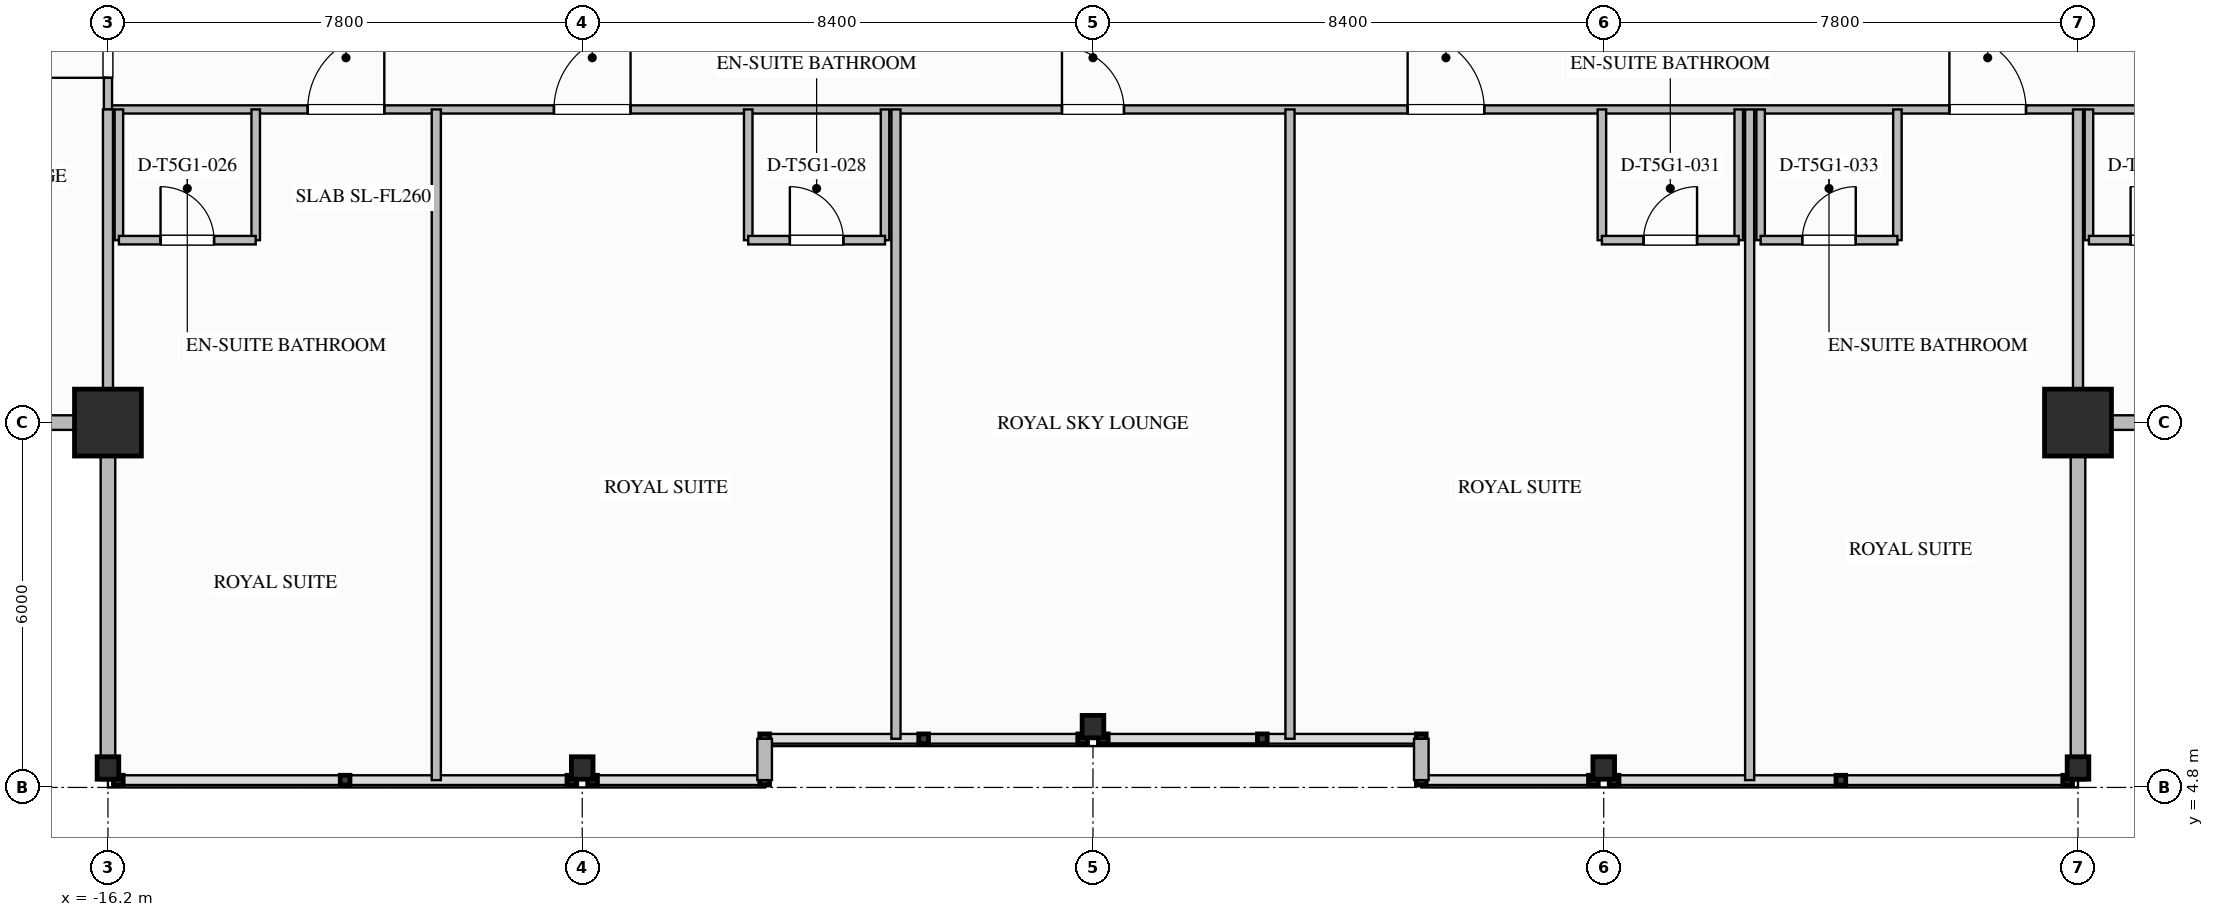
"""IFC4 building model, lengths in metres.
Left out: names, types, materials, properties, quantities, classifications, styles, units other than length and angle.
Written with IfcOpenShell. Run it as: python <this file> out.ifc"""

import sys

from ifc_helpers import new_model, si_unit, direction, frame, frame_2d, origin, origin_2d, place, context, subcontext, project, spatial, rectangle, i_section, extrude, element, fill, save


model = new_model("IFC4")
c1 = context("Model", 3, precision=1e-05, world=origin(), true_north=direction((0.0, 1.0)))
c2 = subcontext(c1, "Body", "Model", "MODEL_VIEW")
j1 = project(units=[si_unit("LENGTHUNIT", "METRE"), si_unit("PLANEANGLEUNIT", "RADIAN")], contexts=[c1])
p1 = place(None, origin())
s1 = spatial("IfcSite", under=j1, at=p1, CompositionType="ELEMENT")
p2 = place(p1, origin())
s2 = spatial("IfcBuilding", under=s1, at=p2, CompositionType="ELEMENT")
p3 = place(p2, frame((0.0, 0.0, 272.3)))
s3 = spatial("IfcBuildingStorey", under=s2, at=p3, CompositionType="ELEMENT", Elevation=272.3)
for number, where, z_axis, x_axis in (
    (1, (-16.2, 10.8, 0.0), (0.0, 0.0, 1.0), (1.0, 0.0, 0.0)),
    (2, (16.2, 10.8, 0.0), (0.0, 0.0, 1.0), (1.0, 0.0, 0.0)),
):
    element("IfcColumn", number, at=place(p3, frame(where, z_axis=z_axis, x_axis=x_axis)), inside=s3, PredefinedType="COLUMN", context=c2, shape_type="SweptSolid", body=[
        extrude(rectangle(XDim=1.1, YDim=1.1, at=origin_2d()), origin(), (0.0, 0.0, 1.0), 3.65),
    ])
for number, where, z_axis, x_axis in (
    (3, (-16.2, 5.12, 0.0), (0.0, 0.0, 1.0), (0.0, 1.0, 0.0)),
    (4, (-8.4, 5.12, 0.0), (0.0, 0.0, 1.0), (0.0, 1.0, 0.0)),
    (5, (0.0, 5.8, 0.0), (0.0, 0.0, 1.0), (0.0, 1.0, 0.0)),
    (6, (8.4, 5.12, 0.0), (0.0, 0.0, 1.0), (0.0, 1.0, 0.0)),
    (7, (16.2, 5.12, 0.0), (0.0, 0.0, 1.0), (0.0, 1.0, 0.0)),
):
    element("IfcColumn", number, at=place(p3, frame(where, z_axis=z_axis, x_axis=x_axis)), inside=s3, PredefinedType="COLUMN", context=c2, shape_type="SweptSolid", body=[
        extrude(i_section(OverallWidth=0.369, OverallDepth=0.356, WebThickness=0.011, FlangeThickness=0.018, FilletRadius=0.025, at=origin_2d()), origin(), (0.0, 0.0, 1.0), 3.647),
    ])
for number, where, z_axis, x_axis in (
    (8, (-16.2, 4.92, 0.0), (0.0, 0.0, 1.0), (0.0, 1.0, 0.0)),
    (9, (-16.2, 10.8, 0.0), (0.0, 0.0, 1.0), (-1.0, 0.0, 0.0)),
    (10, (22.08, 10.8, 0.0), (0.0, 0.0, 1.0), (-1.0, 0.0, 0.0)),
    (11, (16.2, 10.8, 0.0), (0.0, 0.0, 1.0), (0.0, -1.0, 0.0)),
):
    element("IfcWall", number, at=place(p3, frame(where, z_axis=z_axis, x_axis=x_axis)), inside=s3, PredefinedType="STANDARD", context=c2, shape_type="SweptSolid", body=[
        extrude(rectangle(XDim=5.88, YDim=0.24, at=frame_2d((2.94, 0.0))), origin(), (0.0, 0.0, 1.0), 2.779),
    ])
for number, where, z_axis, x_axis in (
    (12, (5.4, 4.92, 0.0), (0.0, 0.0, 1.0), (0.0, 1.0, 0.0)),
    (13, (-5.4, 5.6, 0.0), (0.0, 0.0, 1.0), (0.0, -1.0, 0.0)),
):
    element("IfcWall", number, at=place(p3, frame(where, z_axis=z_axis, x_axis=x_axis)), inside=s3, PredefinedType="STANDARD", context=c2, shape_type="SweptSolid", body=[
        extrude(rectangle(XDim=0.68, YDim=0.24, at=frame_2d((0.34, 0.0))), origin(), (0.0, 0.0, 1.0), 3.39),
    ])
p4 = place(p3, frame((-16.2, 15.95, 0.0), z_axis=(0.0, 0.0, 1.0), x_axis=(1.0, 0.0, 0.0)))
e14 = element("IfcWall", 14, at=p4, inside=s3, PredefinedType="PARTITIONING", context=c2, shape_type="SweptSolid", body=[
    extrude(rectangle(XDim=38.28, YDim=0.135, at=frame_2d((19.14, 0.0))), origin(), (0.0, 0.0, 1.0), 3.39),
])
p5 = place(p4, frame((35.785, 0.0, 0.0)))
e15 = element("IfcOpeningElement", 15, at=p5, cuts=e14, PredefinedType="OPENING", context=c2, shape_type="SweptSolid", body=[
    extrude(rectangle(XDim=1.26, YDim=2.2, at=frame_2d((0.63, 1.1))), frame((0.0, 0.077, 0.0), z_axis=(0.0, -1.0, 0.0), x_axis=(1.0, 0.0, 0.0)), (0.0, 0.0, 1.0), 0.155),
])
p6 = place(p4, frame((3.285, 0.0, 0.0)))
e16 = element("IfcOpeningElement", 16, at=p6, cuts=e14, PredefinedType="OPENING", context=c2, shape_type="SweptSolid", body=[
    extrude(rectangle(XDim=1.26, YDim=2.2, at=frame_2d((0.63, 1.1))), frame((0.0, 0.077, 0.0), z_axis=(0.0, -1.0, 0.0), x_axis=(1.0, 0.0, 0.0)), (0.0, 0.0, 1.0), 0.155),
])
p7 = place(p4, frame((7.335, 0.0, 0.0)))
e17 = element("IfcOpeningElement", 17, at=p7, cuts=e14, PredefinedType="OPENING", context=c2, shape_type="SweptSolid", body=[
    extrude(rectangle(XDim=1.26, YDim=2.2, at=frame_2d((0.63, 1.1))), frame((0.0, 0.077, 0.0), z_axis=(0.0, -1.0, 0.0), x_axis=(1.0, 0.0, 0.0)), (0.0, 0.0, 1.0), 0.155),
])
p8 = place(p4, frame((15.69, 0.0, 0.0)))
e18 = element("IfcOpeningElement", 18, at=p8, cuts=e14, PredefinedType="OPENING", context=c2, shape_type="SweptSolid", body=[
    extrude(rectangle(XDim=1.02, YDim=2.15, at=frame_2d((0.51, 1.075))), frame((0.0, 0.077, 0.0), z_axis=(0.0, -1.0, 0.0), x_axis=(1.0, 0.0, 0.0)), (0.0, 0.0, 1.0), 0.155),
])
p9 = place(p4, frame((21.375, 0.0, 0.0)))
e19 = element("IfcOpeningElement", 19, at=p9, cuts=e14, PredefinedType="OPENING", context=c2, shape_type="SweptSolid", body=[
    extrude(rectangle(XDim=1.26, YDim=2.2, at=frame_2d((0.63, 1.1))), frame((0.0, 0.077, 0.0), z_axis=(0.0, -1.0, 0.0), x_axis=(1.0, 0.0, 0.0)), (0.0, 0.0, 1.0), 0.155),
])
p10 = place(p4, frame((30.285, 0.0, 0.0)))
e20 = element("IfcOpeningElement", 20, at=p10, cuts=e14, PredefinedType="OPENING", context=c2, shape_type="SweptSolid", body=[
    extrude(rectangle(XDim=1.26, YDim=2.2, at=frame_2d((0.63, 1.1))), frame((0.0, 0.077, 0.0), z_axis=(0.0, -1.0, 0.0), x_axis=(1.0, 0.0, 0.0)), (0.0, 0.0, 1.0), 0.155),
])
p11 = place(p3, frame((-16.2, 15.95, 0.0), z_axis=(0.0, 0.0, 1.0), x_axis=(0.0, 1.0, 0.0)))
e21 = element("IfcWall", 21, at=p11, inside=s3, PredefinedType="PARTITIONING", context=c2, shape_type="SweptSolid", body=[
    extrude(rectangle(XDim=2.45, YDim=0.135, at=frame_2d((1.225, 0.0))), origin(), (0.0, 0.0, 1.0), 2.764),
])
p12 = place(p11, frame((0.52, 0.0, 0.0)))
e22 = element("IfcOpeningElement", 22, at=p12, cuts=e21, PredefinedType="OPENING", context=c2, shape_type="SweptSolid", body=[
    extrude(rectangle(XDim=1.02, YDim=2.15, at=frame_2d((0.51, 1.075))), frame((0.0, 0.077, 0.0), z_axis=(0.0, -1.0, 0.0), x_axis=(1.0, 0.0, 0.0)), (0.0, 0.0, 1.0), 0.155),
])
for number, where, z_axis, x_axis in (
    (23, (-16.2, 10.92, 0.0), (0.0, 0.0, 1.0), (0.0, 1.0, 0.0)),
    (24, (16.2, 10.92, 0.0), (0.0, 0.0, 1.0), (0.0, 1.0, 0.0)),
):
    element("IfcWall", number, at=place(p3, frame(where, z_axis=z_axis, x_axis=x_axis)), inside=s3, PredefinedType="PARTITIONING", context=c2, shape_type="SweptSolid", body=[
        extrude(rectangle(XDim=5.03, YDim=0.165, at=frame_2d((2.515, 0.0))), origin(), (0.0, 0.0, 1.0), 2.764),
    ])
p13 = place(p3, frame((16.38, 15.95, 0.0), z_axis=(0.0, 0.0, 1.0), x_axis=(0.0, -1.0, 0.0)))
e25 = element("IfcWall", 25, at=p13, inside=s3, PredefinedType="PLUMBINGWALL", context=c2, shape_type="SweptSolid", body=[
    extrude(rectangle(XDim=2.15, YDim=0.14, at=frame_2d((1.075, 0.0))), origin(), (0.0, 0.0, 1.0), 2.764),
])
p14 = place(p3, frame((16.38, 13.8, 0.0), z_axis=(0.0, 0.0, 1.0), x_axis=(1.0, 0.0, 0.0)))
e26 = element("IfcWall", 26, at=p14, inside=s3, PredefinedType="PLUMBINGWALL", context=c2, shape_type="SweptSolid", body=[
    extrude(rectangle(XDim=2.25, YDim=0.14, at=frame_2d((1.125, 0.0))), origin(), (0.0, 0.0, 1.0), 3.39),
])
p15 = place(p14, frame((0.685, 0.0, 0.0)))
e27 = element("IfcOpeningElement", 27, at=p15, cuts=e26, PredefinedType="OPENING", context=c2, shape_type="SweptSolid", body=[
    extrude(rectangle(XDim=0.88, YDim=2.1, at=frame_2d((0.44, 1.05))), frame((0.0, 0.08, 0.0), z_axis=(0.0, -1.0, 0.0), x_axis=(1.0, 0.0, 0.0)), (0.0, 0.0, 1.0), 0.16),
])
p16 = place(p3, frame((-16.02, 15.95, 0.0), z_axis=(0.0, 0.0, 1.0), x_axis=(0.0, -1.0, 0.0)))
e28 = element("IfcWall", 28, at=p16, inside=s3, PredefinedType="PLUMBINGWALL", context=c2, shape_type="SweptSolid", body=[
    extrude(rectangle(XDim=2.15, YDim=0.14, at=frame_2d((1.075, 0.0))), origin(), (0.0, 0.0, 1.0), 2.764),
])
p17 = place(p3, frame((-13.77, 15.95, 0.0), z_axis=(0.0, 0.0, 1.0), x_axis=(0.0, -1.0, 0.0)))
e29 = element("IfcWall", 29, at=p17, inside=s3, PredefinedType="PLUMBINGWALL", context=c2, shape_type="SweptSolid", body=[
    extrude(rectangle(XDim=2.15, YDim=0.14, at=frame_2d((1.075, 0.0))), origin(), (0.0, 0.0, 1.0), 3.39),
])
p18 = place(p3, frame((-16.02, 13.8, 0.0), z_axis=(0.0, 0.0, 1.0), x_axis=(1.0, 0.0, 0.0)))
e30 = element("IfcWall", 30, at=p18, inside=s3, PredefinedType="PLUMBINGWALL", context=c2, shape_type="SweptSolid", body=[
    extrude(rectangle(XDim=2.25, YDim=0.14, at=frame_2d((1.125, 0.0))), origin(), (0.0, 0.0, 1.0), 3.39),
])
p19 = place(p18, frame((0.685, 0.0, 0.0)))
e31 = element("IfcOpeningElement", 31, at=p19, cuts=e30, PredefinedType="OPENING", context=c2, shape_type="SweptSolid", body=[
    extrude(rectangle(XDim=0.88, YDim=2.1, at=frame_2d((0.44, 1.05))), frame((0.0, 0.08, 0.0), z_axis=(0.0, -1.0, 0.0), x_axis=(1.0, 0.0, 0.0)), (0.0, 0.0, 1.0), 0.16),
])
p20 = place(p3, frame((-10.8, 4.92, 0.0), z_axis=(0.0, 0.0, 1.0), x_axis=(0.0, 1.0, 0.0)))
e32 = element("IfcWall", 32, at=p20, inside=s3, PredefinedType="PARTITIONING", context=c2, shape_type="SweptSolid", body=[
    extrude(rectangle(XDim=11.03, YDim=0.15, at=frame_2d((5.515, 0.0))), origin(), (0.0, 0.0, 1.0), 3.39),
])
for number, where, z_axis, x_axis in (
    (33, (-5.67, 15.95, 0.0), (0.0, 0.0, 1.0), (0.0, -1.0, 0.0)),
    (34, (-3.42, 15.95, 0.0), (0.0, 0.0, 1.0), (0.0, -1.0, 0.0)),
):
    element("IfcWall", number, at=place(p3, frame(where, z_axis=z_axis, x_axis=x_axis)), inside=s3, PredefinedType="PLUMBINGWALL", context=c2, shape_type="SweptSolid", body=[
        extrude(rectangle(XDim=2.15, YDim=0.14, at=frame_2d((1.075, 0.0))), origin(), (0.0, 0.0, 1.0), 3.39),
    ])
p21 = place(p3, frame((-5.67, 13.8, 0.0), z_axis=(0.0, 0.0, 1.0), x_axis=(1.0, 0.0, 0.0)))
e35 = element("IfcWall", 35, at=p21, inside=s3, PredefinedType="PLUMBINGWALL", context=c2, shape_type="SweptSolid", body=[
    extrude(rectangle(XDim=2.25, YDim=0.14, at=frame_2d((1.125, 0.0))), origin(), (0.0, 0.0, 1.0), 3.39),
])
p22 = place(p21, frame((0.685, 0.0, 0.0)))
e36 = element("IfcOpeningElement", 36, at=p22, cuts=e35, PredefinedType="OPENING", context=c2, shape_type="SweptSolid", body=[
    extrude(rectangle(XDim=0.88, YDim=2.1, at=frame_2d((0.44, 1.05))), frame((0.0, 0.08, 0.0), z_axis=(0.0, -1.0, 0.0), x_axis=(1.0, 0.0, 0.0)), (0.0, 0.0, 1.0), 0.16),
])
for number, where, z_axis, x_axis in (
    (37, (-3.24, 5.6, 0.0), (0.0, 0.0, 1.0), (0.0, 1.0, 0.0)),
    (38, (3.24, 5.6, 0.0), (0.0, 0.0, 1.0), (0.0, 1.0, 0.0)),
):
    element("IfcWall", number, at=place(p3, frame(where, z_axis=z_axis, x_axis=x_axis)), inside=s3, PredefinedType="PARTITIONING", context=c2, shape_type="SweptSolid", body=[
        extrude(rectangle(XDim=10.35, YDim=0.15, at=frame_2d((5.175, 0.0))), origin(), (0.0, 0.0, 1.0), 3.39),
    ])
p23 = place(p3, frame((8.37, 15.95, 0.0), z_axis=(0.0, 0.0, 1.0), x_axis=(0.0, -1.0, 0.0)))
e39 = element("IfcWall", 39, at=p23, inside=s3, PredefinedType="PLUMBINGWALL", context=c2, shape_type="SweptSolid", body=[
    extrude(rectangle(XDim=2.15, YDim=0.14, at=frame_2d((1.075, 0.0))), origin(), (0.0, 0.0, 1.0), 2.767),
])
p24 = place(p3, frame((10.62, 15.95, 0.0), z_axis=(0.0, 0.0, 1.0), x_axis=(0.0, -1.0, 0.0)))
e40 = element("IfcWall", 40, at=p24, inside=s3, PredefinedType="PLUMBINGWALL", context=c2, shape_type="SweptSolid", body=[
    extrude(rectangle(XDim=2.15, YDim=0.14, at=frame_2d((1.075, 0.0))), origin(), (0.0, 0.0, 1.0), 3.39),
])
p25 = place(p3, frame((8.37, 13.8, 0.0), z_axis=(0.0, 0.0, 1.0), x_axis=(1.0, 0.0, 0.0)))
e41 = element("IfcWall", 41, at=p25, inside=s3, PredefinedType="PLUMBINGWALL", context=c2, shape_type="SweptSolid", body=[
    extrude(rectangle(XDim=2.25, YDim=0.14, at=frame_2d((1.125, 0.0))), origin(), (0.0, 0.0, 1.0), 3.39),
])
p26 = place(p25, frame((0.685, 0.0, 0.0)))
e42 = element("IfcOpeningElement", 42, at=p26, cuts=e41, PredefinedType="OPENING", context=c2, shape_type="SweptSolid", body=[
    extrude(rectangle(XDim=0.88, YDim=2.1, at=frame_2d((0.44, 1.05))), frame((0.0, 0.08, 0.0), z_axis=(0.0, -1.0, 0.0), x_axis=(1.0, 0.0, 0.0)), (0.0, 0.0, 1.0), 0.16),
])
p27 = place(p3, frame((10.8, 4.92, 0.0), z_axis=(0.0, 0.0, 1.0), x_axis=(0.0, 1.0, 0.0)))
e43 = element("IfcWall", 43, at=p27, inside=s3, PredefinedType="PARTITIONING", context=c2, shape_type="SweptSolid", body=[
    extrude(rectangle(XDim=11.03, YDim=0.15, at=frame_2d((5.515, 0.0))), origin(), (0.0, 0.0, 1.0), 3.39),
])
for number, where, z_axis, x_axis in (
    (44, (10.98, 15.95, 0.0), (0.0, 0.0, 1.0), (0.0, -1.0, 0.0)),
    (45, (13.23, 15.95, 0.0), (0.0, 0.0, 1.0), (0.0, -1.0, 0.0)),
):
    element("IfcWall", number, at=place(p3, frame(where, z_axis=z_axis, x_axis=x_axis)), inside=s3, PredefinedType="PLUMBINGWALL", context=c2, shape_type="SweptSolid", body=[
        extrude(rectangle(XDim=2.15, YDim=0.14, at=frame_2d((1.075, 0.0))), origin(), (0.0, 0.0, 1.0), 3.39),
    ])
p28 = place(p3, frame((10.98, 13.8, 0.0), z_axis=(0.0, 0.0, 1.0), x_axis=(1.0, 0.0, 0.0)))
e46 = element("IfcWall", 46, at=p28, inside=s3, PredefinedType="PLUMBINGWALL", context=c2, shape_type="SweptSolid", body=[
    extrude(rectangle(XDim=2.25, YDim=0.14, at=frame_2d((1.125, 0.0))), origin(), (0.0, 0.0, 1.0), 3.39),
])
p29 = place(p28, frame((0.685, 0.0, 0.0)))
e47 = element("IfcOpeningElement", 47, at=p29, cuts=e46, PredefinedType="OPENING", context=c2, shape_type="SweptSolid", body=[
    extrude(rectangle(XDim=0.88, YDim=2.1, at=frame_2d((0.44, 1.05))), frame((0.0, 0.08, 0.0), z_axis=(0.0, -1.0, 0.0), x_axis=(1.0, 0.0, 0.0)), (0.0, 0.0, 1.0), 0.16),
])
p30 = place(p12, origin())
e48 = element("IfcDoor", 48, at=p30, inside=s3, OperationType="SINGLE_SWING_LEFT", PredefinedType="DOOR", context=c2, shape_type="SweptSolid", body=[
    extrude(rectangle(XDim=1.02, YDim=2.15, at=frame_2d((0.51, 1.075))), frame((0.0, 0.025, 0.0), z_axis=(0.0, -1.0, 0.0), x_axis=(1.0, 0.0, 0.0)), (0.0, 0.0, 1.0), 0.05),
])
fill(e22, e48)
p31 = place(p15, origin())
e49 = element("IfcDoor", 49, at=p31, inside=s3, OperationType="SINGLE_SWING_LEFT", PredefinedType="DOOR", context=c2, shape_type="SweptSolid", body=[
    extrude(rectangle(XDim=0.88, YDim=2.1, at=frame_2d((0.44, 1.05))), frame((0.0, 0.025, 0.0), z_axis=(0.0, -1.0, 0.0), x_axis=(1.0, 0.0, 0.0)), (0.0, 0.0, 1.0), 0.05),
])
fill(e27, e49)
p32 = place(p19, origin())
e50 = element("IfcDoor", 50, at=p32, inside=s3, OperationType="SINGLE_SWING_LEFT", PredefinedType="DOOR", context=c2, shape_type="SweptSolid", body=[
    extrude(rectangle(XDim=0.88, YDim=2.1, at=frame_2d((0.44, 1.05))), frame((0.0, 0.025, 0.0), z_axis=(0.0, -1.0, 0.0), x_axis=(1.0, 0.0, 0.0)), (0.0, 0.0, 1.0), 0.05),
])
fill(e31, e50)
p33 = place(p6, origin())
e51 = element("IfcDoor", 51, at=p33, inside=s3, OperationType="SINGLE_SWING_RIGHT", PredefinedType="DOOR", context=c2, shape_type="SweptSolid", body=[
    extrude(rectangle(XDim=1.26, YDim=2.2, at=frame_2d((0.63, 1.1))), frame((0.0, 0.025, 0.0), z_axis=(0.0, -1.0, 0.0), x_axis=(1.0, 0.0, 0.0)), (0.0, 0.0, 1.0), 0.05),
])
fill(e16, e51)
p34 = place(p22, origin())
e52 = element("IfcDoor", 52, at=p34, inside=s3, OperationType="SINGLE_SWING_LEFT", PredefinedType="DOOR", context=c2, shape_type="SweptSolid", body=[
    extrude(rectangle(XDim=0.88, YDim=2.1, at=frame_2d((0.44, 1.05))), frame((0.0, 0.025, 0.0), z_axis=(0.0, -1.0, 0.0), x_axis=(1.0, 0.0, 0.0)), (0.0, 0.0, 1.0), 0.05),
])
fill(e36, e52)
p35 = place(p7, origin())
e53 = element("IfcDoor", 53, at=p35, inside=s3, OperationType="SINGLE_SWING_RIGHT", PredefinedType="DOOR", context=c2, shape_type="SweptSolid", body=[
    extrude(rectangle(XDim=1.26, YDim=2.2, at=frame_2d((0.63, 1.1))), frame((0.0, 0.025, 0.0), z_axis=(0.0, -1.0, 0.0), x_axis=(1.0, 0.0, 0.0)), (0.0, 0.0, 1.0), 0.05),
])
fill(e17, e53)
p36 = place(p8, origin())
e54 = element("IfcDoor", 54, at=p36, inside=s3, OperationType="SINGLE_SWING_LEFT", PredefinedType="DOOR", context=c2, shape_type="SweptSolid", body=[
    extrude(rectangle(XDim=1.02, YDim=2.15, at=frame_2d((0.51, 1.075))), frame((0.0, 0.025, 0.0), z_axis=(0.0, -1.0, 0.0), x_axis=(1.0, 0.0, 0.0)), (0.0, 0.0, 1.0), 0.05),
])
fill(e18, e54)
p37 = place(p26, origin())
e55 = element("IfcDoor", 55, at=p37, inside=s3, OperationType="SINGLE_SWING_RIGHT", PredefinedType="DOOR", context=c2, shape_type="SweptSolid", body=[
    extrude(rectangle(XDim=0.88, YDim=2.1, at=frame_2d((0.44, 1.05))), frame((0.0, 0.025, 0.0), z_axis=(0.0, -1.0, 0.0), x_axis=(1.0, 0.0, 0.0)), (0.0, 0.0, 1.0), 0.05),
])
fill(e42, e55)
p38 = place(p9, origin())
e56 = element("IfcDoor", 56, at=p38, inside=s3, OperationType="SINGLE_SWING_LEFT", PredefinedType="DOOR", context=c2, shape_type="SweptSolid", body=[
    extrude(rectangle(XDim=1.26, YDim=2.2, at=frame_2d((0.63, 1.1))), frame((0.0, 0.025, 0.0), z_axis=(0.0, -1.0, 0.0), x_axis=(1.0, 0.0, 0.0)), (0.0, 0.0, 1.0), 0.05),
])
fill(e19, e56)
p39 = place(p29, origin())
e57 = element("IfcDoor", 57, at=p39, inside=s3, OperationType="SINGLE_SWING_RIGHT", PredefinedType="DOOR", context=c2, shape_type="SweptSolid", body=[
    extrude(rectangle(XDim=0.88, YDim=2.1, at=frame_2d((0.44, 1.05))), frame((0.0, 0.025, 0.0), z_axis=(0.0, -1.0, 0.0), x_axis=(1.0, 0.0, 0.0)), (0.0, 0.0, 1.0), 0.05),
])
fill(e47, e57)
p40 = place(p10, origin())
e58 = element("IfcDoor", 58, at=p40, inside=s3, OperationType="SINGLE_SWING_LEFT", PredefinedType="DOOR", context=c2, shape_type="SweptSolid", body=[
    extrude(rectangle(XDim=1.26, YDim=2.2, at=frame_2d((0.63, 1.1))), frame((0.0, 0.025, 0.0), z_axis=(0.0, -1.0, 0.0), x_axis=(1.0, 0.0, 0.0)), (0.0, 0.0, 1.0), 0.05),
])
fill(e20, e58)
save(model, sys.argv[1])
